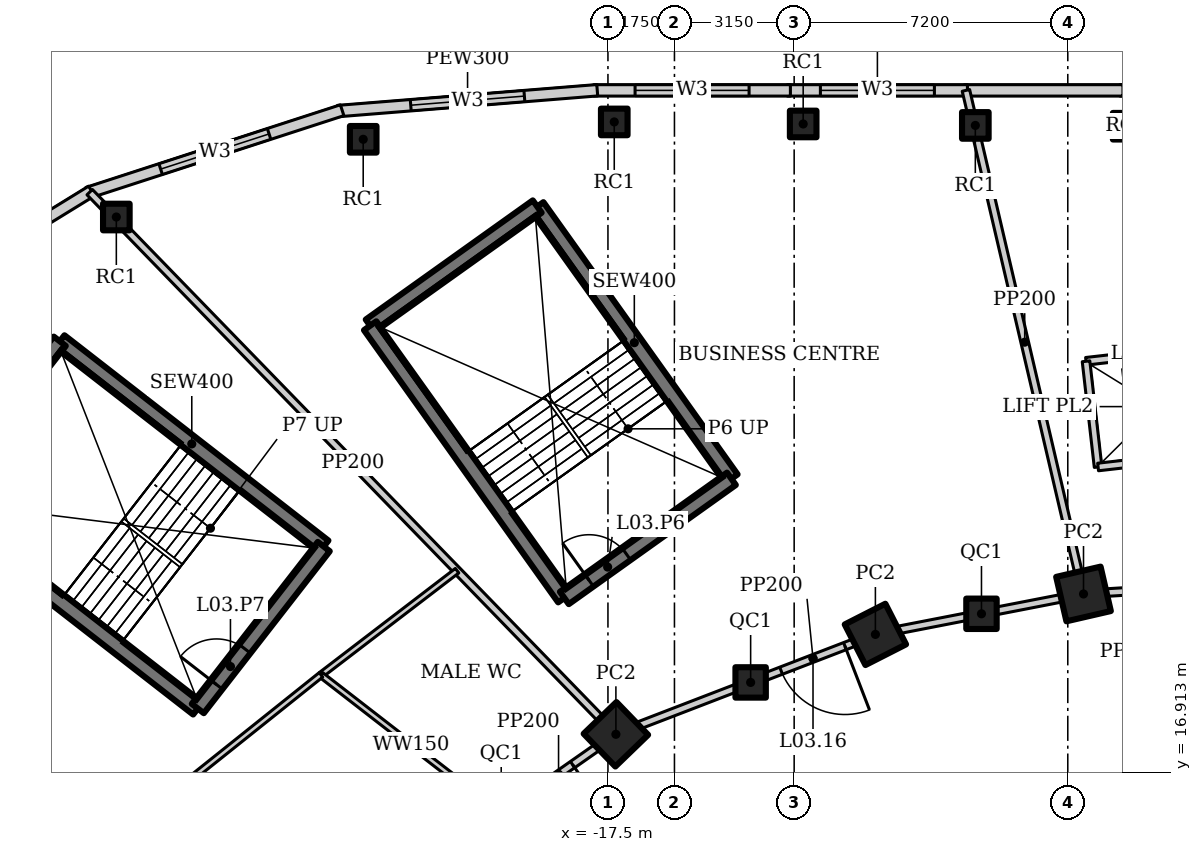
"""IFC4 building model, lengths in metres.
Left out: names, types, materials, properties, quantities, classifications, styles, units other than length and angle.
Written with IfcOpenShell. Run it as: python <this file> out.ifc"""

import sys

from ifc_helpers import new_model, si_unit, direction, frame, frame_2d, origin, origin_2d, place, context, subcontext, project, spatial, rectangle, hollow_rectangle, extrude, element, fill, save


model = new_model("IFC4")
c1 = context("Model", 3, precision=1e-05, world=origin(), true_north=direction((0.0, 1.0)))
c2 = subcontext(c1, "Body", "Model", "MODEL_VIEW")
j1 = project(units=[si_unit("LENGTHUNIT", "METRE"), si_unit("PLANEANGLEUNIT", "RADIAN")], contexts=[c1])
p1 = place(None, origin())
s1 = spatial("IfcSite", under=j1, at=p1, CompositionType="ELEMENT")
p2 = place(p1, origin())
s2 = spatial("IfcBuilding", under=s1, at=p2, CompositionType="ELEMENT")
p3 = place(p2, frame((0.0, 0.0, 22.0)))
s3 = spatial("IfcBuildingStorey", under=s2, at=p3, CompositionType="ELEMENT", Elevation=22.0)
for number, where, z_axis, x_axis in (
    (1, (-4.986, 21.598, 0.0), (0.0, 0.0, 1.0), (0.974, 0.225, 0.0)),
    (2, (-10.463, 20.534, 0.0), (0.0, 0.0, 1.0), (0.891, 0.454, 0.0)),
    (3, (-17.291, 17.905, 0.0), (0.0, 0.0, 1.0), (0.719, 0.695, 0.0)),
):
    element("IfcColumn", number, at=place(p3, frame(where, z_axis=z_axis, x_axis=x_axis)), inside=s3, PredefinedType="COLUMN", context=c2, shape_type="SweptSolid", body=[
        extrude(hollow_rectangle(XDim=1.2, YDim=1.2, WallThickness=0.1, at=origin_2d()), origin(), (0.0, 0.0, 1.0), 5.0),
    ])
for number, where, z_axis, x_axis in (
    (4, (-7.671, 21.076, 0.0), (0.0, 0.0, 1.0), (1.0, 0.0, 0.0)),
    (5, (-13.745, 19.27, 0.0), (0.0, 0.0, 1.0), (1.0, 0.0, 0.0)),
):
    element("IfcColumn", number, at=place(p3, frame(where, z_axis=z_axis, x_axis=x_axis)), inside=s3, PredefinedType="COLUMN", context=c2, shape_type="SweptSolid", body=[
        extrude(hollow_rectangle(XDim=0.8, YDim=0.8, WallThickness=0.05, at=origin_2d()), origin(), (0.0, 0.0, 1.0), 5.0),
    ])
for number, where, z_axis, x_axis in (
    (6, (-3.863, 33.907, 0.0), (0.0, 0.0, 1.0), (1.0, 0.0, 0.0)),
    (7, (-12.363, 33.966, 0.0), (0.0, 0.0, 1.0), (1.0, 0.0, 0.0)),
    (8, (-23.94, 33.563, 0.0), (0.0, 0.0, 1.0), (1.0, 0.0, 0.0)),
    (9, (-7.833, 33.928, 0.0), (0.0, 0.0, 1.0), (1.0, 0.0, 0.0)),
    (10, (-17.334, 34.02, 0.0), (0.0, 0.0, 1.0), (1.0, 0.0, 0.0)),
    (11, (-30.436, 31.518, 0.0), (0.0, 0.0, 1.0), (1.0, 0.0, 0.0)),
):
    element("IfcColumn", number, at=place(p3, frame(where, z_axis=z_axis, x_axis=x_axis)), inside=s3, PredefinedType="COLUMN", context=c2, shape_type="SweptSolid", body=[
        extrude(hollow_rectangle(XDim=0.7, YDim=0.7, WallThickness=0.04, at=origin_2d()), origin(), (0.0, 0.0, 1.0), 5.0),
    ])
p4 = place(p3, frame((0.04, 34.85, 0.0), z_axis=(0.0, 0.0, 1.0), x_axis=(-1.0, 0.0, 0.0)))
e12 = element("IfcWall", 12, at=p4, inside=s3, PredefinedType="SOLIDWALL", context=c2, shape_type="SweptSolid", body=[
    extrude(rectangle(XDim=4.068, YDim=0.3, at=frame_2d((2.034, 0.0))), origin(), (0.0, 0.0, 1.0), 4.8),
])
p5 = place(p3, frame((-3.948, 34.85, 0.0), z_axis=(0.0, 0.0, 1.0), x_axis=(-1.0, 0.0, 0.0)))
e13 = element("IfcWall", 13, at=p5, inside=s3, PredefinedType="SOLIDWALL", context=c2, shape_type="SweptSolid", body=[
    extrude(rectangle(XDim=4.173, YDim=0.3, at=frame_2d((2.086, 0.0))), origin(), (0.0, 0.0, 1.0), 4.8),
])
p6 = place(p3, frame((-8.04, 34.85, 0.0), z_axis=(0.0, 0.0, 1.0), x_axis=(-1.0, 0.0, 0.0)))
e14 = element("IfcWall", 14, at=p6, inside=s3, PredefinedType="SOLIDWALL", context=c2, shape_type="SweptSolid", body=[
    extrude(rectangle(XDim=4.739, YDim=0.3, at=frame_2d((2.369, 0.0))), origin(), (0.0, 0.0, 1.0), 4.8),
])
p7 = place(p6, frame((0.869, 0.0, 0.9)))
e15 = element("IfcOpeningElement", 15, at=p7, cuts=e14, PredefinedType="OPENING", context=c2, shape_type="SweptSolid", body=[
    extrude(rectangle(XDim=3.0, YDim=2.0, at=frame_2d((1.5, 1.0))), frame((0.0, 0.16, 0.0), z_axis=(0.0, -1.0, 0.0), x_axis=(1.0, 0.0, 0.0)), (0.0, 0.0, 1.0), 0.32),
])
p8 = place(p3, frame((-12.699, 34.85, 0.0), z_axis=(0.0, 0.0, 1.0), x_axis=(-1.0, 0.0, 0.0)))
e16 = element("IfcWall", 16, at=p8, inside=s3, PredefinedType="SOLIDWALL", context=c2, shape_type="SweptSolid", body=[
    extrude(rectangle(XDim=5.174, YDim=0.3, at=frame_2d((2.587, 0.0))), origin(), (0.0, 0.0, 1.0), 4.8),
])
p9 = place(p8, frame((1.087, 0.0, 0.9)))
e17 = element("IfcOpeningElement", 17, at=p9, cuts=e16, PredefinedType="OPENING", context=c2, shape_type="SweptSolid", body=[
    extrude(rectangle(XDim=3.0, YDim=2.0, at=frame_2d((1.5, 1.0))), frame((0.0, 0.16, 0.0), z_axis=(0.0, -1.0, 0.0), x_axis=(1.0, 0.0, 0.0)), (0.0, 0.0, 1.0), 0.32),
])
p10 = place(p3, frame((-17.781, 34.854, 0.0), z_axis=(0.0, 0.0, 1.0), x_axis=(-0.996791084449, -0.080047073422, 0.0)))
e18 = element("IfcWall", 18, at=p10, inside=s3, PredefinedType="SOLIDWALL", context=c2, shape_type="SweptSolid", body=[
    extrude(rectangle(XDim=6.847, YDim=0.3, at=frame_2d((3.424, 0.0))), origin(), (0.0, 0.0, 1.0), 4.8),
])
p11 = place(p10, frame((1.924, 0.0, 0.9)))
e19 = element("IfcOpeningElement", 19, at=p11, cuts=e18, PredefinedType="OPENING", context=c2, shape_type="SweptSolid", body=[
    extrude(rectangle(XDim=3.0, YDim=2.0, at=frame_2d((1.5, 1.0))), frame((0.0, 0.16, 0.0), z_axis=(0.0, -1.0, 0.0), x_axis=(1.0, 0.0, 0.0)), (0.0, 0.0, 1.0), 0.32),
])
p12 = place(p3, frame((-24.495, 34.328, 0.0), z_axis=(0.0, 0.0, 1.0), x_axis=(-0.951140010357, -0.308759907853, 0.0)))
e20 = element("IfcWall", 20, at=p12, inside=s3, PredefinedType="SOLIDWALL", context=c2, shape_type="SweptSolid", body=[
    extrude(rectangle(XDim=7.041, YDim=0.3, at=frame_2d((3.521, 0.0))), origin(), (0.0, 0.0, 1.0), 4.8),
])
p13 = place(p12, frame((2.021, 0.0, 0.9)))
e21 = element("IfcOpeningElement", 21, at=p13, cuts=e20, PredefinedType="OPENING", context=c2, shape_type="SweptSolid", body=[
    extrude(rectangle(XDim=3.0, YDim=2.0, at=frame_2d((1.5, 1.0))), frame((0.0, 0.16, 0.0), z_axis=(0.0, -1.0, 0.0), x_axis=(1.0, 0.0, 0.0)), (0.0, 0.0, 1.0), 0.32),
])
p14 = place(p3, frame((-31.088, 32.202, 0.0), z_axis=(0.0, 0.0, 1.0), x_axis=(-0.851808565246, -0.52385319334, 0.0)))
e22 = element("IfcWall", 22, at=p14, inside=s3, PredefinedType="SOLIDWALL", context=c2, shape_type="SweptSolid", body=[
    extrude(rectangle(XDim=6.861, YDim=0.3, at=frame_2d((3.43, 0.0))), origin(), (0.0, 0.0, 1.0), 4.8),
])
p15 = place(p14, frame((1.93, 0.0, 0.9)))
e23 = element("IfcOpeningElement", 23, at=p15, cuts=e22, PredefinedType="OPENING", context=c2, shape_type="SweptSolid", body=[
    extrude(rectangle(XDim=3.0, YDim=2.0, at=frame_2d((1.5, 1.0))), frame((0.0, 0.16, 0.0), z_axis=(0.0, -1.0, 0.0), x_axis=(1.0, 0.0, 0.0)), (0.0, 0.0, 1.0), 0.32),
])
p16 = place(p3, frame((-2.478, 21.75, 0.0), z_axis=(0.0, 0.0, 1.0), x_axis=(-0.998172405641, -0.060430527186, 0.0)))
e24 = element("IfcWall", 24, at=p16, inside=s3, PredefinedType="SOLIDWALL", context=c2, shape_type="SweptSolid", body=[
    extrude(rectangle(XDim=2.513, YDim=0.2, at=frame_2d((1.256, 0.0))), origin(), (0.0, 0.0, 1.0), 4.099),
])
p17 = place(p3, frame((-4.986, 21.598, 0.0), z_axis=(0.0, 0.0, 1.0), x_axis=(-0.981637218105, -0.190757364289, 0.0)))
e25 = element("IfcWall", 25, at=p17, inside=s3, PredefinedType="SOLIDWALL", context=c2, shape_type="SweptSolid", body=[
    extrude(rectangle(XDim=2.735, YDim=0.2, at=frame_2d((1.368, 0.0))), origin(), (0.0, 0.0, 1.0), 4.394),
])
p18 = place(p3, frame((-7.671, 21.076, 0.0), z_axis=(0.0, 0.0, 1.0), x_axis=(-0.98163593748, -0.190763954266, 0.0)))
e26 = element("IfcWall", 26, at=p18, inside=s3, PredefinedType="SOLIDWALL", context=c2, shape_type="SweptSolid", body=[
    extrude(rectangle(XDim=2.844, YDim=0.2, at=frame_2d((1.422, 0.0))), origin(), (0.0, 0.0, 1.0), 4.35),
])
p19 = place(p3, frame((-10.463, 20.534, 0.0), z_axis=(0.0, 0.0, 1.0), x_axis=(-0.933241815012, -0.359248820058, 0.0)))
e27 = element("IfcWall", 27, at=p19, inside=s3, PredefinedType="SOLIDWALL", context=c2, shape_type="SweptSolid", body=[
    extrude(rectangle(XDim=3.518, YDim=0.2, at=frame_2d((1.759, 0.0))), origin(), (0.0, 0.0, 1.0), 4.396),
])
p20 = place(p19, frame((0.859, 0.0, 0.0)))
e28 = element("IfcOpeningElement", 28, at=p20, cuts=e27, PredefinedType="OPENING", context=c2, shape_type="SweptSolid", body=[
    extrude(rectangle(XDim=1.8, YDim=2.4, at=frame_2d((0.9, 1.2))), frame((0.0, 0.11, 0.0), z_axis=(0.0, -1.0, 0.0), x_axis=(1.0, 0.0, 0.0)), (0.0, 0.0, 1.0), 0.22),
])
p21 = place(p3, frame((-13.745, 19.27, 0.0), z_axis=(0.0, 0.0, 1.0), x_axis=(-0.933224646415, -0.359293416754, 0.0)))
e29 = element("IfcWall", 29, at=p21, inside=s3, PredefinedType="SOLIDWALL", context=c2, shape_type="SweptSolid", body=[
    extrude(rectangle(XDim=3.799, YDim=0.2, at=frame_2d((1.899, 0.0))), origin(), (0.0, 0.0, 1.0), 4.355),
])
p22 = place(p3, frame((-17.291, 17.905, 0.0), z_axis=(0.0, 0.0, 1.0), x_axis=(-0.819409395821, -0.573208724672, 0.0)))
e30 = element("IfcWall", 30, at=p22, inside=s3, PredefinedType="SOLIDWALL", context=c2, shape_type="SweptSolid", body=[
    extrude(rectangle(XDim=3.683, YDim=0.2, at=frame_2d((1.841, 0.0))), origin(), (0.0, 0.0, 1.0), 4.396),
])
p23 = place(p22, frame((1.391, 0.0, 0.0)))
e31 = element("IfcOpeningElement", 31, at=p23, cuts=e30, PredefinedType="OPENING", context=c2, shape_type="SweptSolid", body=[
    extrude(rectangle(XDim=0.9, YDim=2.1, at=frame_2d((0.45, 1.05))), frame((0.0, 0.11, 0.0), z_axis=(0.0, -1.0, 0.0), x_axis=(1.0, 0.0, 0.0)), (0.0, 0.0, 1.0), 0.22),
])
p24 = place(p3, frame((-4.986, 21.598, 0.0), z_axis=(0.0, 0.0, 1.0), x_axis=(-0.227360055616, 0.973810764528, 0.0)))
e32 = element("IfcWall", 32, at=p24, inside=s3, PredefinedType="SOLIDWALL", context=c2, shape_type="SweptSolid", body=[
    extrude(rectangle(XDim=13.608, YDim=0.2, at=frame_2d((6.804, 0.0))), origin(), (0.0, 0.0, 1.0), 4.028),
])
p25 = place(p3, frame((-17.291, 17.905, 0.0), z_axis=(0.0, 0.0, 1.0), x_axis=(-0.696460684513, 0.717594951855, 0.0)))
e33 = element("IfcWall", 33, at=p25, inside=s3, PredefinedType="SOLIDWALL", context=c2, shape_type="SweptSolid", body=[
    extrude(rectangle(XDim=19.881, YDim=0.2, at=frame_2d((9.94, 0.0))), origin(), (0.0, 0.0, 1.0), 3.3),
])
p26 = place(p3, frame((-21.469, 22.211, 0.0), z_axis=(0.0, 0.0, 1.0), x_axis=(-0.794122703503, -0.607757461313, 0.0)))
e34 = element("IfcWall", 34, at=p26, inside=s3, PredefinedType="SOLIDWALL", context=c2, shape_type="SweptSolid", body=[
    extrude(rectangle(XDim=4.51, YDim=0.15, at=frame_2d((2.255, 0.0))), origin(), (0.0, 0.0, 1.0), 4.8),
])
p27 = place(p3, frame((-20.309, 15.794, 0.0), z_axis=(0.0, 0.0, 1.0), x_axis=(-0.790437708207, 0.61254243073, 0.0)))
e35 = element("IfcWall", 35, at=p27, inside=s3, PredefinedType="SOLIDWALL", context=c2, shape_type="SweptSolid", body=[
    extrude(rectangle(XDim=6.0, YDim=0.15, at=frame_2d((3.0, 0.0))), origin(), (0.0, 0.0, 1.0), 4.8),
])
p28 = place(p3, frame((-25.051, 19.469, 0.0), z_axis=(0.0, 0.0, 1.0), x_axis=(-0.781204641684, -0.624275025779, 0.0)))
e36 = element("IfcWall", 36, at=p28, inside=s3, PredefinedType="SOLIDWALL", context=c2, shape_type="SweptSolid", body=[
    extrude(rectangle(XDim=4.821, YDim=0.15, at=frame_2d((2.411, 0.0))), origin(), (0.0, 0.0, 1.0), 4.8),
])
p29 = place(p3, frame((-14.251, 24.629, 0.0), z_axis=(0.0, 0.0, 1.0), x_axis=(-0.580705313356, 0.814113836659, 0.0)))
e37 = element("IfcWall", 37, at=p29, inside=s3, PredefinedType="SHEAR", context=c2, shape_type="SweptSolid", body=[
    extrude(rectangle(XDim=8.8, YDim=0.4, at=frame_2d((4.4, 0.0))), origin(), (0.0, 0.0, 1.0), 5.0),
])
p30 = place(p3, frame((-19.361, 31.793, 0.0), z_axis=(0.0, 0.0, 1.0), x_axis=(-0.814121252423, -0.580694916762, 0.0)))
e38 = element("IfcWall", 38, at=p30, inside=s3, PredefinedType="SHEAR", context=c2, shape_type="SweptSolid", body=[
    extrude(rectangle(XDim=5.4, YDim=0.4, at=frame_2d((2.7, 0.0))), origin(), (0.0, 0.0, 1.0), 5.0),
])
p31 = place(p3, frame((-23.757, 28.657, 0.0), z_axis=(0.0, 0.0, 1.0), x_axis=(0.580705313356, -0.814113836659, 0.0)))
e39 = element("IfcWall", 39, at=p31, inside=s3, PredefinedType="SHEAR", context=c2, shape_type="SweptSolid", body=[
    extrude(rectangle(XDim=8.8, YDim=0.4, at=frame_2d((4.4, 0.0))), origin(), (0.0, 0.0, 1.0), 5.0),
])
p32 = place(p3, frame((-18.647, 21.493, 0.0), z_axis=(0.0, 0.0, 1.0), x_axis=(0.814121252423, 0.580694916762, 0.0)))
e40 = element("IfcWall", 40, at=p32, inside=s3, PredefinedType="SHEAR", context=c2, shape_type="SweptSolid", body=[
    extrude(rectangle(XDim=5.4, YDim=0.4, at=frame_2d((2.7, 0.0))), origin(), (0.0, 0.0, 1.0), 5.0),
])
p33 = place(p32, frame((0.8, 0.0, 0.0)))
e41 = element("IfcOpeningElement", 41, at=p33, cuts=e40, PredefinedType="OPENING", context=c2, shape_type="SweptSolid", body=[
    extrude(rectangle(XDim=1.2, YDim=2.1, at=frame_2d((0.6, 1.05))), frame((0.0, 0.21, 0.0), z_axis=(0.0, -1.0, 0.0), x_axis=(1.0, 0.0, 0.0)), (0.0, 0.0, 1.0), 0.42),
])
p34 = place(p3, frame((-24.978, 22.846, 0.0), z_axis=(0.0, 0.0, 1.0), x_axis=(-0.78938060008, 0.613904119726, 0.0)))
e42 = element("IfcWall", 42, at=p34, inside=s3, PredefinedType="SHEAR", context=c2, shape_type="SweptSolid", body=[
    extrude(rectangle(XDim=8.8, YDim=0.4, at=frame_2d((4.4, 0.0))), origin(), (0.0, 0.0, 1.0), 5.0),
])
p35 = place(p3, frame((-31.924, 28.248, 0.0), z_axis=(0.0, 0.0, 1.0), x_axis=(-0.613912443548, -0.789374126544, 0.0)))
e43 = element("IfcWall", 43, at=p35, inside=s3, PredefinedType="SHEAR", context=c2, shape_type="SweptSolid", body=[
    extrude(rectangle(XDim=5.4, YDim=0.4, at=frame_2d((2.7, 0.0))), origin(), (0.0, 0.0, 1.0), 5.0),
])
p36 = place(p3, frame((-35.239, 23.985, 0.0), z_axis=(0.0, 0.0, 1.0), x_axis=(0.78938060008, -0.613904119726, 0.0)))
e44 = element("IfcWall", 44, at=p36, inside=s3, PredefinedType="SHEAR", context=c2, shape_type="SweptSolid", body=[
    extrude(rectangle(XDim=8.8, YDim=0.4, at=frame_2d((4.4, 0.0))), origin(), (0.0, 0.0, 1.0), 5.0),
])
p37 = place(p3, frame((-28.293, 18.583, 0.0), z_axis=(0.0, 0.0, 1.0), x_axis=(0.613912443548, 0.789374126544, 0.0)))
e45 = element("IfcWall", 45, at=p37, inside=s3, PredefinedType="SHEAR", context=c2, shape_type="SweptSolid", body=[
    extrude(rectangle(XDim=5.4, YDim=0.4, at=frame_2d((2.7, 0.0))), origin(), (0.0, 0.0, 1.0), 5.0),
])
p38 = place(p37, frame((0.8, 0.0, 0.0)))
e46 = element("IfcOpeningElement", 46, at=p38, cuts=e45, PredefinedType="OPENING", context=c2, shape_type="SweptSolid", body=[
    extrude(rectangle(XDim=1.2, YDim=2.1, at=frame_2d((0.6, 1.05))), frame((0.0, 0.21, 0.0), z_axis=(0.0, -1.0, 0.0), x_axis=(1.0, 0.0, 0.0)), (0.0, 0.0, 1.0), 0.42),
])
p39 = place(p3, frame((-1.442, 28.117, 0.0), z_axis=(0.0, 0.0, 1.0), x_axis=(-0.993571061716, -0.113210182053, 0.0)))
e47 = element("IfcWall", 47, at=p39, inside=s3, PredefinedType="SOLIDWALL", context=c2, shape_type="SweptSolid", body=[
    extrude(rectangle(XDim=3.5, YDim=0.2, at=frame_2d((1.75, 0.0))), origin(), (0.0, 0.0, 1.0), 4.8),
])
p40 = place(p3, frame((-4.92, 27.721, 0.0), z_axis=(0.0, 0.0, 1.0), x_axis=(0.113177712989, -0.993574760792, 0.0)))
e48 = element("IfcWall", 48, at=p40, inside=s3, PredefinedType="SOLIDWALL", context=c2, shape_type="SweptSolid", body=[
    extrude(rectangle(XDim=2.8, YDim=0.2, at=frame_2d((1.4, 0.0))), origin(), (0.0, 0.0, 1.0), 4.8),
])
p41 = place(p3, frame((-4.603, 24.939, 0.0), z_axis=(0.0, 0.0, 1.0), x_axis=(0.993571061716, 0.113210182053, 0.0)))
e49 = element("IfcWall", 49, at=p41, inside=s3, PredefinedType="SOLIDWALL", context=c2, shape_type="SweptSolid", body=[
    extrude(rectangle(XDim=3.5, YDim=0.2, at=frame_2d((1.75, 0.0))), origin(), (0.0, 0.0, 1.0), 4.8),
])
p42 = place(p41, frame((1.2, 0.0, 0.0)))
e50 = element("IfcOpeningElement", 50, at=p42, cuts=e49, PredefinedType="OPENING", context=c2, shape_type="SweptSolid", body=[
    extrude(rectangle(XDim=1.1, YDim=2.2, at=frame_2d((0.55, 1.1))), frame((0.0, 0.11, 0.0), z_axis=(0.0, -1.0, 0.0), x_axis=(1.0, 0.0, 0.0)), (0.0, 0.0, 1.0), 0.22),
])
p43 = place(p7, origin())
e51 = element("IfcWindow", 51, at=p43, inside=s3, PartitioningType="SINGLE_PANEL", PredefinedType="WINDOW", context=c2, shape_type="SweptSolid", body=[
    extrude(rectangle(XDim=3.0, YDim=2.0, at=frame_2d((1.5, 1.0))), frame((0.0, 0.03, 0.0), z_axis=(0.0, -1.0, 0.0), x_axis=(1.0, 0.0, 0.0)), (0.0, 0.0, 1.0), 0.06),
])
fill(e15, e51)
p44 = place(p9, origin())
e52 = element("IfcWindow", 52, at=p44, inside=s3, PartitioningType="SINGLE_PANEL", PredefinedType="WINDOW", context=c2, shape_type="SweptSolid", body=[
    extrude(rectangle(XDim=3.0, YDim=2.0, at=frame_2d((1.5, 1.0))), frame((0.0, 0.03, 0.0), z_axis=(0.0, -1.0, 0.0), x_axis=(1.0, 0.0, 0.0)), (0.0, 0.0, 1.0), 0.06),
])
fill(e17, e52)
p45 = place(p11, origin())
e53 = element("IfcWindow", 53, at=p45, inside=s3, PartitioningType="SINGLE_PANEL", PredefinedType="WINDOW", context=c2, shape_type="SweptSolid", body=[
    extrude(rectangle(XDim=3.0, YDim=2.0, at=frame_2d((1.5, 1.0))), frame((0.0, 0.03, 0.0), z_axis=(0.0, -1.0, 0.0), x_axis=(1.0, 0.0, 0.0)), (0.0, 0.0, 1.0), 0.06),
])
fill(e19, e53)
p46 = place(p13, origin())
e54 = element("IfcWindow", 54, at=p46, inside=s3, PartitioningType="SINGLE_PANEL", PredefinedType="WINDOW", context=c2, shape_type="SweptSolid", body=[
    extrude(rectangle(XDim=3.0, YDim=2.0, at=frame_2d((1.5, 1.0))), frame((0.0, 0.03, 0.0), z_axis=(0.0, -1.0, 0.0), x_axis=(1.0, 0.0, 0.0)), (0.0, 0.0, 1.0), 0.06),
])
fill(e21, e54)
p47 = place(p20, origin())
e55 = element("IfcDoor", 55, at=p47, inside=s3, OperationType="DOUBLE_DOOR_DOUBLE_SWING", PredefinedType="DOOR", context=c2, shape_type="SweptSolid", body=[
    extrude(rectangle(XDim=1.8, YDim=2.4, at=frame_2d((0.9, 1.2))), frame((0.0, 0.025, 0.0), z_axis=(0.0, -1.0, 0.0), x_axis=(1.0, 0.0, 0.0)), (0.0, 0.0, 1.0), 0.05),
])
fill(e28, e55)
p48 = place(p23, origin())
e56 = element("IfcDoor", 56, at=p48, inside=s3, OperationType="SINGLE_SWING_LEFT", PredefinedType="DOOR", context=c2, shape_type="SweptSolid", body=[
    extrude(rectangle(XDim=0.9, YDim=2.1, at=frame_2d((0.45, 1.05))), frame((0.0, 0.025, 0.0), z_axis=(0.0, -1.0, 0.0), x_axis=(1.0, 0.0, 0.0)), (0.0, 0.0, 1.0), 0.05),
])
fill(e31, e56)
p49 = place(p33, origin())
e57 = element("IfcDoor", 57, at=p49, inside=s3, OperationType="SINGLE_SWING_RIGHT", PredefinedType="DOOR", context=c2, shape_type="SweptSolid", body=[
    extrude(rectangle(XDim=1.2, YDim=2.1, at=frame_2d((0.6, 1.05))), frame((0.0, 0.025, 0.0), z_axis=(0.0, -1.0, 0.0), x_axis=(1.0, 0.0, 0.0)), (0.0, 0.0, 1.0), 0.05),
])
fill(e41, e57)
p50 = place(p38, origin())
e58 = element("IfcDoor", 58, at=p50, inside=s3, OperationType="SINGLE_SWING_RIGHT", PredefinedType="DOOR", context=c2, shape_type="SweptSolid", body=[
    extrude(rectangle(XDim=1.2, YDim=2.1, at=frame_2d((0.6, 1.05))), frame((0.0, 0.025, 0.0), z_axis=(0.0, -1.0, 0.0), x_axis=(1.0, 0.0, 0.0)), (0.0, 0.0, 1.0), 0.05),
])
fill(e46, e58)
save(model, sys.argv[1])
